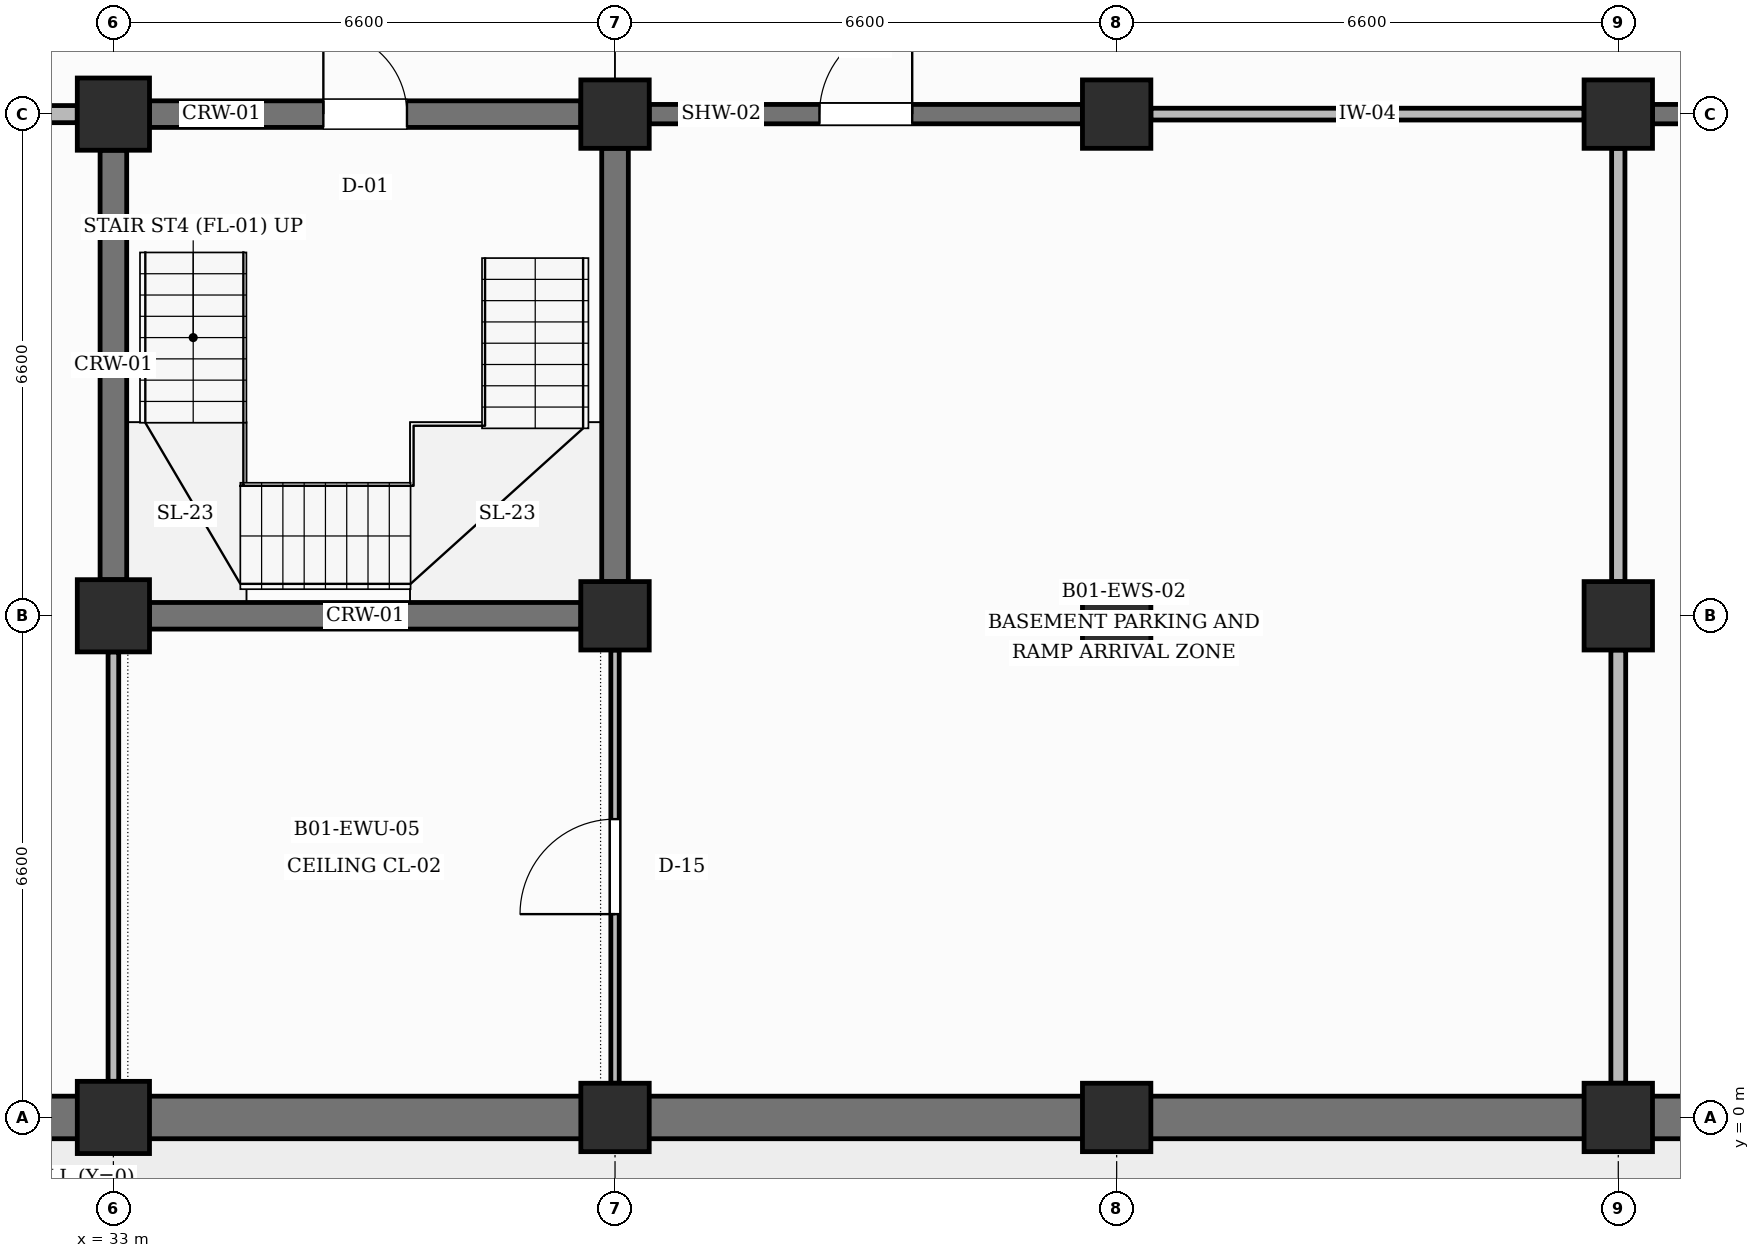
"""IFC4 building model, lengths in metres.
Left out: names, types, materials, properties, quantities, classifications, styles, units other than length and angle.
Written with IfcOpenShell. Run it as: python <this file> out.ifc"""

import sys

from ifc_helpers import new_model, si_unit, direction, frame, frame_2d, origin, origin_2d, place, context, subcontext, project, spatial, rectangle, extrude, element, fill, save


model = new_model("IFC4")
c1 = context("Model", 3, precision=1e-05, world=origin(), true_north=direction((0.0, 1.0)))
c2 = subcontext(c1, "Body", "Model", "MODEL_VIEW")
j1 = project(units=[si_unit("LENGTHUNIT", "METRE"), si_unit("PLANEANGLEUNIT", "RADIAN")], contexts=[c1])
p1 = place(None, origin())
s1 = spatial("IfcSite", under=j1, at=p1, CompositionType="ELEMENT")
p2 = place(p1, origin())
s2 = spatial("IfcBuilding", under=s1, at=p2, CompositionType="ELEMENT")
p3 = place(p2, frame((0.0, 0.0, -4.5)))
s3 = spatial("IfcBuildingStorey", under=s2, at=p3, CompositionType="ELEMENT", Elevation=-4.5)
for number, where, z_axis, x_axis in (
    (1, (33.0, 0.0, 0.0), (0.0, 0.0, 1.0), (1.0, 0.0, 0.0)),
    (2, (33.0, 6.6, 0.0), (0.0, 0.0, 1.0), (1.0, 0.0, 0.0)),
    (3, (33.0, 13.2, 0.0), (0.0, 0.0, 1.0), (1.0, 0.0, 0.0)),
):
    element("IfcColumn", number, at=place(p3, frame(where, z_axis=z_axis, x_axis=x_axis)), inside=s3, PredefinedType="COLUMN", context=c2, shape_type="SweptSolid", body=[
        extrude(rectangle(XDim=0.95, YDim=0.95, at=origin_2d()), origin(), (0.0, 0.0, 1.0), 4.5),
    ])
for number, where, z_axis, x_axis in (
    (4, (39.6, 0.0, 0.0), (0.0, 0.0, 1.0), (1.0, 0.0, 0.0)),
    (5, (39.6, 6.6, 0.0), (0.0, 0.0, 1.0), (1.0, 0.0, 0.0)),
    (6, (39.6, 13.2, 0.0), (0.0, 0.0, 1.0), (1.0, 0.0, 0.0)),
    (7, (46.2, 0.0, 0.0), (0.0, 0.0, 1.0), (1.0, 0.0, 0.0)),
    (8, (46.2, 6.6, 0.0), (0.0, 0.0, 1.0), (1.0, 0.0, 0.0)),
    (9, (46.2, 13.2, 0.0), (0.0, 0.0, 1.0), (1.0, 0.0, 0.0)),
    (10, (52.8, 0.0, 0.0), (0.0, 0.0, 1.0), (1.0, 0.0, 0.0)),
    (11, (52.8, 6.6, 0.0), (0.0, 0.0, 1.0), (1.0, 0.0, 0.0)),
    (12, (52.8, 13.2, 0.0), (0.0, 0.0, 1.0), (1.0, 0.0, 0.0)),
):
    element("IfcColumn", number, at=place(p3, frame(where, z_axis=z_axis, x_axis=x_axis)), inside=s3, PredefinedType="COLUMN", context=c2, shape_type="SweptSolid", body=[
        extrude(rectangle(XDim=0.9, YDim=0.9, at=origin_2d()), origin(), (0.0, 0.0, 1.0), 4.5),
    ])
p4 = place(p3, frame((26.875, 0.0, 0.0), z_axis=(0.0, 0.0, 1.0), x_axis=(1.0, 0.0, 0.0)))
e13 = element("IfcWall", 13, at=p4, inside=s3, PredefinedType="USERDEFINED", context=c2, shape_type="SweptSolid", body=[
    extrude(rectangle(XDim=5.65, YDim=0.56, at=frame_2d((2.825, 0.0))), origin(), (0.0, 0.0, 1.0), 3.49),
])
p5 = place(p3, frame((33.475, 0.0, 0.0), z_axis=(0.0, 0.0, 1.0), x_axis=(1.0, 0.0, 0.0)))
e14 = element("IfcWall", 14, at=p5, inside=s3, PredefinedType="USERDEFINED", context=c2, shape_type="SweptSolid", body=[
    extrude(rectangle(XDim=5.675, YDim=0.56, at=frame_2d((2.837, 0.0))), origin(), (0.0, 0.0, 1.0), 3.49),
])
p6 = place(p3, frame((40.05, 0.0, 0.0), z_axis=(0.0, 0.0, 1.0), x_axis=(1.0, 0.0, 0.0)))
e15 = element("IfcWall", 15, at=p6, inside=s3, PredefinedType="USERDEFINED", context=c2, shape_type="SweptSolid", body=[
    extrude(rectangle(XDim=5.7, YDim=0.56, at=frame_2d((2.85, 0.0))), origin(), (0.0, 0.0, 1.0), 3.49),
])
p7 = place(p3, frame((46.65, 0.0, 0.0), z_axis=(0.0, 0.0, 1.0), x_axis=(1.0, 0.0, 0.0)))
e16 = element("IfcWall", 16, at=p7, inside=s3, PredefinedType="USERDEFINED", context=c2, shape_type="SweptSolid", body=[
    extrude(rectangle(XDim=5.7, YDim=0.56, at=frame_2d((2.85, 0.0))), origin(), (0.0, 0.0, 1.0), 3.49),
])
p8 = place(p3, frame((53.25, 0.0, 0.0), z_axis=(0.0, 0.0, 1.0), x_axis=(1.0, 0.0, 0.0)))
e17 = element("IfcWall", 17, at=p8, inside=s3, PredefinedType="USERDEFINED", context=c2, shape_type="SweptSolid", body=[
    extrude(rectangle(XDim=5.7, YDim=0.56, at=frame_2d((2.85, 0.0))), origin(), (0.0, 0.0, 1.0), 3.49),
])
p9 = place(p3, frame((33.475, 6.6, 0.0), z_axis=(0.0, 0.0, 1.0), x_axis=(1.0, 0.0, 0.0)))
e18 = element("IfcWall", 18, at=p9, inside=s3, PredefinedType="SHEAR", context=c2, shape_type="SweptSolid", body=[
    extrude(rectangle(XDim=5.675, YDim=0.35, at=frame_2d((2.837, 0.0))), origin(), (0.0, 0.0, 1.0), 3.24),
])
p10 = place(p3, frame((33.475, 13.2, 0.0), z_axis=(0.0, 0.0, 1.0), x_axis=(1.0, 0.0, 0.0)))
e19 = element("IfcWall", 19, at=p10, inside=s3, PredefinedType="SHEAR", context=c2, shape_type="SweptSolid", body=[
    extrude(rectangle(XDim=5.675, YDim=0.35, at=frame_2d((2.837, 0.0))), origin(), (0.0, 0.0, 1.0), 3.34),
])
p11 = place(p10, frame((2.288, 0.0, 0.0)))
e20 = element("IfcOpeningElement", 20, at=p11, cuts=e19, PredefinedType="OPENING", context=c2, shape_type="SweptSolid", body=[
    extrude(rectangle(XDim=1.1, YDim=2.15, at=frame_2d((0.55, 1.075))), frame((0.0, 0.185, 0.0), z_axis=(0.0, -1.0, 0.0), x_axis=(1.0, 0.0, 0.0)), (0.0, 0.0, 1.0), 0.37),
])
p12 = place(p3, frame((33.0, 7.075, 0.0), z_axis=(0.0, 0.0, 1.0), x_axis=(0.0, 1.0, 0.0)))
e21 = element("IfcWall", 21, at=p12, inside=s3, PredefinedType="SHEAR", context=c2, shape_type="SweptSolid", body=[
    extrude(rectangle(XDim=5.65, YDim=0.35, at=frame_2d((2.825, 0.0))), origin(), (0.0, 0.0, 1.0), 3.34),
])
p13 = place(p3, frame((39.6, 7.05, 0.0), z_axis=(0.0, 0.0, 1.0), x_axis=(0.0, 1.0, 0.0)))
e22 = element("IfcWall", 22, at=p13, inside=s3, PredefinedType="SHEAR", context=c2, shape_type="SweptSolid", body=[
    extrude(rectangle(XDim=5.7, YDim=0.35, at=frame_2d((2.85, 0.0))), origin(), (0.0, 0.0, 1.0), 3.34),
])
p14 = place(p3, frame((33.0, 0.475, 0.0), z_axis=(0.0, 0.0, 1.0), x_axis=(0.0, 1.0, 0.0)))
e23 = element("IfcWall", 23, at=p14, inside=s3, PredefinedType="PARTITIONING", context=c2, shape_type="SweptSolid", body=[
    extrude(rectangle(XDim=5.65, YDim=0.14, at=frame_2d((2.825, 0.0))), origin(), (0.0, 0.0, 1.0), 3.34),
])
p15 = place(p3, frame((26.875, 13.2, 0.0), z_axis=(0.0, 0.0, 1.0), x_axis=(1.0, 0.0, 0.0)))
e24 = element("IfcWall", 24, at=p15, inside=s3, PredefinedType="PARTITIONING", context=c2, shape_type="SweptSolid", body=[
    extrude(rectangle(XDim=5.65, YDim=0.225, at=frame_2d((2.825, 0.0))), origin(), (0.0, 0.0, 1.0), 3.24),
])
p16 = place(p15, frame((2.115, 0.0, 0.0)))
e25 = element("IfcOpeningElement", 25, at=p16, cuts=e24, PredefinedType="OPENING", context=c2, shape_type="SweptSolid", body=[
    extrude(rectangle(XDim=1.42, YDim=2.2, at=frame_2d((0.71, 1.1))), frame((0.0, 0.123, 0.0), z_axis=(0.0, -1.0, 0.0), x_axis=(1.0, 0.0, 0.0)), (0.0, 0.0, 1.0), 0.245),
])
p17 = place(p3, frame((39.6, 0.45, 0.0), z_axis=(0.0, 0.0, 1.0), x_axis=(0.0, 1.0, 0.0)))
e26 = element("IfcWall", 26, at=p17, inside=s3, PredefinedType="PARTITIONING", context=c2, shape_type="SweptSolid", body=[
    extrude(rectangle(XDim=5.7, YDim=0.11, at=frame_2d((2.85, 0.0))), origin(), (0.0, 0.0, 1.0), 3.34),
])
p18 = place(p17, frame((2.225, 0.0, 0.0)))
e27 = element("IfcOpeningElement", 27, at=p18, cuts=e26, PredefinedType="OPENING", context=c2, shape_type="SweptSolid", body=[
    extrude(rectangle(XDim=1.25, YDim=2.25, at=frame_2d((0.625, 1.125))), frame((0.0, 0.065, 0.0), z_axis=(0.0, -1.0, 0.0), x_axis=(1.0, 0.0, 0.0)), (0.0, 0.0, 1.0), 0.13),
])
p19 = place(p3, frame((40.05, 13.2, 0.0), z_axis=(0.0, 0.0, 1.0), x_axis=(1.0, 0.0, 0.0)))
e28 = element("IfcWall", 28, at=p19, inside=s3, PredefinedType="SHEAR", context=c2, shape_type="SweptSolid", body=[
    extrude(rectangle(XDim=5.7, YDim=0.255, at=frame_2d((2.85, 0.0))), origin(), (0.0, 0.0, 1.0), 3.24),
])
p20 = place(p19, frame((2.24, 0.0, 0.0)))
e29 = element("IfcOpeningElement", 29, at=p20, cuts=e28, PredefinedType="OPENING", context=c2, shape_type="SweptSolid", body=[
    extrude(rectangle(XDim=1.22, YDim=2.15, at=frame_2d((0.61, 1.075))), frame((0.0, 0.137, 0.0), z_axis=(0.0, -1.0, 0.0), x_axis=(1.0, 0.0, 0.0)), (0.0, 0.0, 1.0), 0.275),
])
p21 = place(p3, frame((52.8, 0.45, 0.0), z_axis=(0.0, 0.0, 1.0), x_axis=(0.0, 1.0, 0.0)))
e30 = element("IfcWall", 30, at=p21, inside=s3, PredefinedType="PARTITIONING", context=c2, shape_type="SweptSolid", body=[
    extrude(rectangle(XDim=5.7, YDim=0.195, at=frame_2d((2.85, 0.0))), origin(), (0.0, 0.0, 1.0), 3.34),
])
p22 = place(p3, frame((52.8, 7.05, 0.0), z_axis=(0.0, 0.0, 1.0), x_axis=(0.0, 1.0, 0.0)))
e31 = element("IfcWall", 31, at=p22, inside=s3, PredefinedType="PARTITIONING", context=c2, shape_type="SweptSolid", body=[
    extrude(rectangle(XDim=5.7, YDim=0.175, at=frame_2d((2.85, 0.0))), origin(), (0.0, 0.0, 1.0), 3.34),
])
p23 = place(p3, frame((46.65, 13.2, 0.0), z_axis=(0.0, 0.0, 1.0), x_axis=(1.0, 0.0, 0.0)))
e32 = element("IfcWall", 32, at=p23, inside=s3, PredefinedType="PARTITIONING", context=c2, shape_type="SweptSolid", body=[
    extrude(rectangle(XDim=5.7, YDim=0.155, at=frame_2d((2.85, 0.0))), origin(), (0.0, 0.0, 1.0), 3.34),
])
p24 = place(p3, frame((53.25, 13.2, 0.0), z_axis=(0.0, 0.0, 1.0), x_axis=(1.0, 0.0, 0.0)))
e33 = element("IfcWall", 33, at=p24, inside=s3, PredefinedType="SHEAR", context=c2, shape_type="SweptSolid", body=[
    extrude(rectangle(XDim=5.7, YDim=0.255, at=frame_2d((2.85, 0.0))), origin(), (0.0, 0.0, 1.0), 3.24),
])
p25 = place(p24, frame((2.14, 0.0, 0.0)))
e34 = element("IfcOpeningElement", 34, at=p25, cuts=e33, PredefinedType="OPENING", context=c2, shape_type="SweptSolid", body=[
    extrude(rectangle(XDim=1.42, YDim=2.2, at=frame_2d((0.71, 1.1))), frame((0.0, 0.137, 0.0), z_axis=(0.0, -1.0, 0.0), x_axis=(1.0, 0.0, 0.0)), (0.0, 0.0, 1.0), 0.275),
])
p26 = place(p11, origin())
e35 = element("IfcDoor", 35, at=p26, inside=s3, OperationType="SINGLE_SWING_LEFT", PredefinedType="DOOR", context=c2, shape_type="SweptSolid", body=[
    extrude(rectangle(XDim=1.1, YDim=2.15, at=frame_2d((0.55, 1.075))), frame((0.0, 0.025, 0.0), z_axis=(0.0, -1.0, 0.0), x_axis=(1.0, 0.0, 0.0)), (0.0, 0.0, 1.0), 0.05),
])
fill(e20, e35)
p27 = place(p20, origin())
e36 = element("IfcDoor", 36, at=p27, inside=s3, OperationType="SINGLE_SWING_RIGHT", PredefinedType="DOOR", context=c2, shape_type="SweptSolid", body=[
    extrude(rectangle(XDim=1.22, YDim=2.15, at=frame_2d((0.61, 1.075))), frame((0.0, 0.025, 0.0), z_axis=(0.0, -1.0, 0.0), x_axis=(1.0, 0.0, 0.0)), (0.0, 0.0, 1.0), 0.05),
])
fill(e29, e36)
p28 = place(p18, origin())
e37 = element("IfcDoor", 37, at=p28, inside=s3, OperationType="SINGLE_SWING_LEFT", PredefinedType="DOOR", context=c2, shape_type="SweptSolid", body=[
    extrude(rectangle(XDim=1.25, YDim=2.25, at=frame_2d((0.625, 1.125))), frame((0.0, 0.025, 0.0), z_axis=(0.0, -1.0, 0.0), x_axis=(1.0, 0.0, 0.0)), (0.0, 0.0, 1.0), 0.05),
])
fill(e27, e37)
save(model, sys.argv[1])
